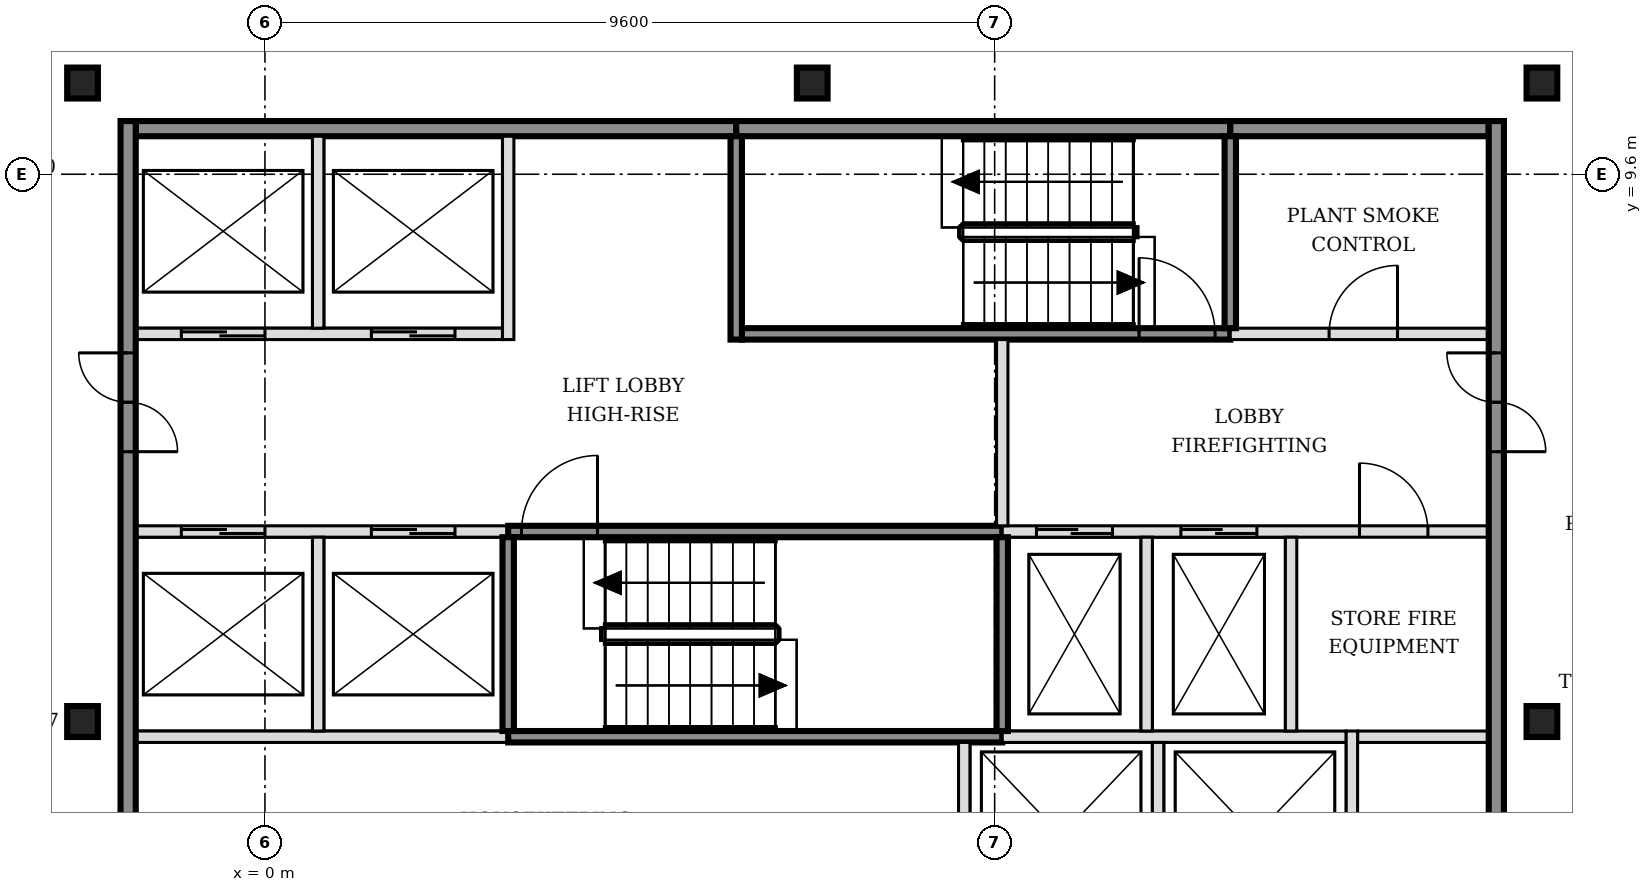
"""IFC4 building model, lengths in metres.
Left out: names, types, materials, properties, quantities, classifications, styles, units other than length and angle.
Written with IfcOpenShell. Run it as: python <this file> out.ifc"""

import sys

from ifc_helpers import new_model, si_unit, direction, frame, frame_2d, origin, origin_2d, place, context, subcontext, project, spatial, rectangle, i_section, extrude, element, fill, save


model = new_model("IFC4")
c1 = context("Model", 3, precision=1e-05, world=origin(), true_north=direction((0.0, 1.0)))
c2 = subcontext(c1, "Body", "Model", "MODEL_VIEW")
j1 = project(units=[si_unit("LENGTHUNIT", "METRE"), si_unit("PLANEANGLEUNIT", "RADIAN")], contexts=[c1])
p1 = place(None, origin())
s1 = spatial("IfcSite", under=j1, at=p1, CompositionType="ELEMENT")
p2 = place(p1, origin())
s2 = spatial("IfcBuilding", under=s1, at=p2, CompositionType="ELEMENT")
p3 = place(p2, frame((0.0, 0.0, 204.6)))
s3 = spatial("IfcBuildingStorey", under=s2, at=p3, CompositionType="ELEMENT", Elevation=204.6)
for number, where, z_axis, x_axis in (
    (1, (-2.4, 2.4, -0.25), (0.0, 0.0, 1.0), (1.0, 0.0, 0.0)),
    (2, (16.8, 2.4, -0.25), (0.0, 0.0, 1.0), (1.0, 0.0, 0.0)),
    (3, (-2.4, 10.8, -0.25), (0.0, 0.0, 1.0), (1.0, 0.0, 0.0)),
    (4, (7.2, 10.8, -0.25), (0.0, 0.0, 1.0), (1.0, 0.0, 0.0)),
    (5, (16.8, 10.8, -0.25), (0.0, 0.0, 1.0), (1.0, 0.0, 0.0)),
):
    element("IfcColumn", number, at=place(p3, frame(where, z_axis=z_axis, x_axis=x_axis)), inside=s3, PredefinedType="COLUMN", context=c2, shape_type="SweptSolid", body=[
        extrude(i_section(OverallWidth=0.404, OverallDepth=0.407, WebThickness=0.027, FlangeThickness=0.044, FilletRadius=0.015, at=origin_2d()), origin(), (0.0, 0.0, 1.0), 6.1),
    ])
p4 = place(p3, frame((-1.7, 2.2, 0.0), z_axis=(0.0, 0.0, 1.0), x_axis=(1.0, 0.0, 0.0)))
e6 = element("IfcWall", 6, at=p4, inside=s3, PredefinedType="SOLIDWALL", context=c2, shape_type="SweptSolid", body=[
    extrude(rectangle(XDim=4.9, YDim=0.15, at=frame_2d((2.45, 0.0))), origin(), (0.0, 0.0, 1.0), 5.85),
])
p5 = place(p3, frame((3.2, 2.2, 0.0), z_axis=(0.0, 0.0, 1.0), x_axis=(1.0, 0.0, 0.0)))
e7 = element("IfcWall", 7, at=p5, inside=s3, PredefinedType="SOLIDWALL", context=c2, shape_type="SweptSolid", body=[
    extrude(rectangle(XDim=6.5, YDim=0.15, at=frame_2d((3.25, 0.0))), origin(), (0.0, 0.0, 1.0), 5.85),
])
p6 = place(p3, frame((9.7, 2.2, 0.0), z_axis=(0.0, 0.0, 1.0), x_axis=(1.0, 0.0, 0.0)))
e8 = element("IfcWall", 8, at=p6, inside=s3, PredefinedType="SOLIDWALL", context=c2, shape_type="SweptSolid", body=[
    extrude(rectangle(XDim=4.525, YDim=0.15, at=frame_2d((2.263, 0.0))), origin(), (0.0, 0.0, 1.0), 5.85),
])
p7 = place(p3, frame((14.375, 2.2, 0.0), z_axis=(0.0, 0.0, 1.0), x_axis=(1.0, 0.0, 0.0)))
e9 = element("IfcWall", 9, at=p7, inside=s3, PredefinedType="PARTITIONING", context=c2, shape_type="SweptSolid", body=[
    extrude(rectangle(XDim=1.725, YDim=0.15, at=frame_2d((0.863, 0.0))), origin(), (0.0, 0.0, 1.0), 5.85),
])
p8 = place(p3, frame((-1.7, 4.9, 0.0), z_axis=(0.0, 0.0, 1.0), x_axis=(1.0, 0.0, 0.0)))
e10 = element("IfcWall", 10, at=p8, inside=s3, PredefinedType="SOLIDWALL", context=c2, shape_type="SweptSolid", body=[
    extrude(rectangle(XDim=4.9, YDim=0.15, at=frame_2d((2.45, 0.0))), origin(), (0.0, 0.0, 1.0), 5.85),
])
p9 = place(p8, frame((0.6, 0.0, 0.0)))
e11 = element("IfcOpeningElement", 11, at=p9, cuts=e10, PredefinedType="OPENING", context=c2, shape_type="SweptSolid", body=[
    extrude(rectangle(XDim=1.1, YDim=2.1, at=frame_2d((0.55, 1.05))), frame((0.0, 0.085, 0.0), z_axis=(0.0, -1.0, 0.0), x_axis=(1.0, 0.0, 0.0)), (0.0, 0.0, 1.0), 0.17),
])
p10 = place(p8, frame((3.1, 0.0, 0.0)))
e12 = element("IfcOpeningElement", 12, at=p10, cuts=e10, PredefinedType="OPENING", context=c2, shape_type="SweptSolid", body=[
    extrude(rectangle(XDim=1.1, YDim=2.1, at=frame_2d((0.55, 1.05))), frame((0.0, 0.085, 0.0), z_axis=(0.0, -1.0, 0.0), x_axis=(1.0, 0.0, 0.0)), (0.0, 0.0, 1.0), 0.17),
])
p11 = place(p3, frame((3.2, 4.9, 0.0), z_axis=(0.0, 0.0, 1.0), x_axis=(1.0, 0.0, 0.0)))
e13 = element("IfcWall", 13, at=p11, inside=s3, PredefinedType="SOLIDWALL", context=c2, shape_type="SweptSolid", body=[
    extrude(rectangle(XDim=6.5, YDim=0.15, at=frame_2d((3.25, 0.0))), origin(), (0.0, 0.0, 1.0), 5.85),
])
p12 = place(p11, frame((0.175, 0.0, 0.0)))
e14 = element("IfcOpeningElement", 14, at=p12, cuts=e13, PredefinedType="OPENING", context=c2, shape_type="SweptSolid", body=[
    extrude(rectangle(XDim=1.0, YDim=2.1, at=frame_2d((0.5, 1.05))), frame((0.0, 0.085, 0.0), z_axis=(0.0, -1.0, 0.0), x_axis=(1.0, 0.0, 0.0)), (0.0, 0.0, 1.0), 0.17),
])
p13 = place(p3, frame((9.7, 4.9, 0.0), z_axis=(0.0, 0.0, 1.0), x_axis=(1.0, 0.0, 0.0)))
e15 = element("IfcWall", 15, at=p13, inside=s3, PredefinedType="SOLIDWALL", context=c2, shape_type="SweptSolid", body=[
    extrude(rectangle(XDim=6.4, YDim=0.15, at=frame_2d((3.2, 0.0))), origin(), (0.0, 0.0, 1.0), 5.85),
])
p14 = place(p13, frame((0.45, 0.0, 0.0)))
e16 = element("IfcOpeningElement", 16, at=p14, cuts=e15, PredefinedType="OPENING", context=c2, shape_type="SweptSolid", body=[
    extrude(rectangle(XDim=1.0, YDim=2.1, at=frame_2d((0.5, 1.05))), frame((0.0, 0.085, 0.0), z_axis=(0.0, -1.0, 0.0), x_axis=(1.0, 0.0, 0.0)), (0.0, 0.0, 1.0), 0.17),
])
p15 = place(p13, frame((2.35, 0.0, 0.0)))
e17 = element("IfcOpeningElement", 17, at=p15, cuts=e15, PredefinedType="OPENING", context=c2, shape_type="SweptSolid", body=[
    extrude(rectangle(XDim=1.0, YDim=2.1, at=frame_2d((0.5, 1.05))), frame((0.0, 0.085, 0.0), z_axis=(0.0, -1.0, 0.0), x_axis=(1.0, 0.0, 0.0)), (0.0, 0.0, 1.0), 0.17),
])
p16 = place(p13, frame((4.7, 0.0, 0.0)))
e18 = element("IfcOpeningElement", 18, at=p16, cuts=e15, PredefinedType="OPENING", context=c2, shape_type="SweptSolid", body=[
    extrude(rectangle(XDim=0.9, YDim=2.1, at=frame_2d((0.45, 1.05))), frame((0.0, 0.085, 0.0), z_axis=(0.0, -1.0, 0.0), x_axis=(1.0, 0.0, 0.0)), (0.0, 0.0, 1.0), 0.17),
])
p17 = place(p3, frame((-1.7, 7.5, 0.0), z_axis=(0.0, 0.0, 1.0), x_axis=(1.0, 0.0, 0.0)))
e19 = element("IfcWall", 19, at=p17, inside=s3, PredefinedType="SOLIDWALL", context=c2, shape_type="SweptSolid", body=[
    extrude(rectangle(XDim=4.825, YDim=0.15, at=frame_2d((2.413, 0.0))), origin(), (0.0, 0.0, 1.0), 5.85),
])
p18 = place(p17, frame((0.6, 0.0, 0.0)))
e20 = element("IfcOpeningElement", 20, at=p18, cuts=e19, PredefinedType="OPENING", context=c2, shape_type="SweptSolid", body=[
    extrude(rectangle(XDim=1.1, YDim=2.1, at=frame_2d((0.55, 1.05))), frame((0.0, 0.085, 0.0), z_axis=(0.0, -1.0, 0.0), x_axis=(1.0, 0.0, 0.0)), (0.0, 0.0, 1.0), 0.17),
])
p19 = place(p17, frame((3.1, 0.0, 0.0)))
e21 = element("IfcOpeningElement", 21, at=p19, cuts=e19, PredefinedType="OPENING", context=c2, shape_type="SweptSolid", body=[
    extrude(rectangle(XDim=1.1, YDim=2.1, at=frame_2d((0.55, 1.05))), frame((0.0, 0.085, 0.0), z_axis=(0.0, -1.0, 0.0), x_axis=(1.0, 0.0, 0.0)), (0.0, 0.0, 1.0), 0.17),
])
p20 = place(p3, frame((6.275, 7.5, 0.0), z_axis=(0.0, 0.0, 1.0), x_axis=(1.0, 0.0, 0.0)))
e22 = element("IfcWall", 22, at=p20, inside=s3, PredefinedType="SOLIDWALL", context=c2, shape_type="SweptSolid", body=[
    extrude(rectangle(XDim=6.425, YDim=0.15, at=frame_2d((3.212, 0.0))), origin(), (0.0, 0.0, 1.0), 5.85),
])
p21 = place(p20, frame((5.225, 0.0, 0.0)))
e23 = element("IfcOpeningElement", 23, at=p21, cuts=e22, PredefinedType="OPENING", context=c2, shape_type="SweptSolid", body=[
    extrude(rectangle(XDim=1.0, YDim=2.1, at=frame_2d((0.5, 1.05))), frame((0.0, 0.085, 0.0), z_axis=(0.0, -1.0, 0.0), x_axis=(1.0, 0.0, 0.0)), (0.0, 0.0, 1.0), 0.17),
])
p22 = place(p3, frame((12.7, 7.5, 0.0), z_axis=(0.0, 0.0, 1.0), x_axis=(1.0, 0.0, 0.0)))
e24 = element("IfcWall", 24, at=p22, inside=s3, PredefinedType="SOLIDWALL", context=c2, shape_type="SweptSolid", body=[
    extrude(rectangle(XDim=3.4, YDim=0.15, at=frame_2d((1.7, 0.0))), origin(), (0.0, 0.0, 1.0), 5.85),
])
p23 = place(p22, frame((1.3, 0.0, 0.0)))
e25 = element("IfcOpeningElement", 25, at=p23, cuts=e24, PredefinedType="OPENING", context=c2, shape_type="SweptSolid", body=[
    extrude(rectangle(XDim=0.9, YDim=2.1, at=frame_2d((0.45, 1.05))), frame((0.0, 0.085, 0.0), z_axis=(0.0, -1.0, 0.0), x_axis=(1.0, 0.0, 0.0)), (0.0, 0.0, 1.0), 0.17),
])
p24 = place(p3, frame((-1.7, 10.2, 0.0), z_axis=(0.0, 0.0, 1.0), x_axis=(1.0, 0.0, 0.0)))
e26 = element("IfcWall", 26, at=p24, inside=s3, PredefinedType="SOLIDWALL", context=c2, shape_type="SweptSolid", body=[
    extrude(rectangle(XDim=7.9, YDim=0.2, at=frame_2d((3.95, 0.0))), origin(), (0.0, 0.0, 1.0), 5.85),
])
p25 = place(p3, frame((6.2, 10.2, 0.0), z_axis=(0.0, 0.0, 1.0), x_axis=(1.0, 0.0, 0.0)))
e27 = element("IfcWall", 27, at=p25, inside=s3, PredefinedType="SOLIDWALL", context=c2, shape_type="SweptSolid", body=[
    extrude(rectangle(XDim=6.5, YDim=0.2, at=frame_2d((3.25, 0.0))), origin(), (0.0, 0.0, 1.0), 5.85),
])
p26 = place(p3, frame((12.7, 10.2, 0.0), z_axis=(0.0, 0.0, 1.0), x_axis=(1.0, 0.0, 0.0)))
e28 = element("IfcWall", 28, at=p26, inside=s3, PredefinedType="SOLIDWALL", context=c2, shape_type="SweptSolid", body=[
    extrude(rectangle(XDim=3.4, YDim=0.2, at=frame_2d((1.7, 0.0))), origin(), (0.0, 0.0, 1.0), 5.85),
])
p27 = place(p3, frame((-1.8, -5.5, 0.0), z_axis=(0.0, 0.0, 1.0), x_axis=(0.0, 1.0, 0.0)))
e29 = element("IfcWall", 29, at=p27, inside=s3, PredefinedType="SOLIDWALL", context=c2, shape_type="SweptSolid", body=[
    extrude(rectangle(XDim=15.8, YDim=0.2, at=frame_2d((7.9, 0.0))), origin(), (0.0, 0.0, 1.0), 5.85),
])
p28 = place(p27, frame((3.05, 0.0, 0.0)))
e30 = element("IfcOpeningElement", 30, at=p28, cuts=e29, PredefinedType="OPENING", context=c2, shape_type="SweptSolid", body=[
    extrude(rectangle(XDim=1.3, YDim=2.1, at=frame_2d((0.65, 1.05))), frame((0.0, 0.11, 0.0), z_axis=(0.0, -1.0, 0.0), x_axis=(1.0, 0.0, 0.0)), (0.0, 0.0, 1.0), 0.22),
])
p29 = place(p27, frame((11.45, 0.0, 0.0)))
e31 = element("IfcOpeningElement", 31, at=p29, cuts=e29, PredefinedType="OPENING", context=c2, shape_type="SweptSolid", body=[
    extrude(rectangle(XDim=1.3, YDim=2.1, at=frame_2d((0.65, 1.05))), frame((0.0, 0.11, 0.0), z_axis=(0.0, -1.0, 0.0), x_axis=(1.0, 0.0, 0.0)), (0.0, 0.0, 1.0), 0.22),
])
p30 = place(p3, frame((0.7, 2.275, 0.0), z_axis=(0.0, 0.0, 1.0), x_axis=(0.0, 1.0, 0.0)))
e32 = element("IfcWall", 32, at=p30, inside=s3, PredefinedType="SOLIDWALL", context=c2, shape_type="SweptSolid", body=[
    extrude(rectangle(XDim=2.55, YDim=0.15, at=frame_2d((1.275, 0.0))), origin(), (0.0, 0.0, 1.0), 5.85),
])
p31 = place(p3, frame((0.7, 7.575, 0.0), z_axis=(0.0, 0.0, 1.0), x_axis=(0.0, 1.0, 0.0)))
e33 = element("IfcWall", 33, at=p31, inside=s3, PredefinedType="SOLIDWALL", context=c2, shape_type="SweptSolid", body=[
    extrude(rectangle(XDim=2.525, YDim=0.15, at=frame_2d((1.263, 0.0))), origin(), (0.0, 0.0, 1.0), 5.85),
])
p32 = place(p3, frame((3.2, 2.275, 0.0), z_axis=(0.0, 0.0, 1.0), x_axis=(0.0, 1.0, 0.0)))
e34 = element("IfcWall", 34, at=p32, inside=s3, PredefinedType="SOLIDWALL", context=c2, shape_type="SweptSolid", body=[
    extrude(rectangle(XDim=2.55, YDim=0.15, at=frame_2d((1.275, 0.0))), origin(), (0.0, 0.0, 1.0), 5.85),
])
for number, where, z_axis, x_axis in (
    (35, (3.2, 7.425, 0.0), (0.0, 0.0, 1.0), (0.0, 1.0, 0.0)),
    (36, (6.2, 7.425, 0.0), (0.0, 0.0, 1.0), (0.0, 1.0, 0.0)),
):
    element("IfcWall", number, at=place(p3, frame(where, z_axis=z_axis, x_axis=x_axis)), inside=s3, PredefinedType="SOLIDWALL", context=c2, shape_type="SweptSolid", body=[
        extrude(rectangle(XDim=2.675, YDim=0.15, at=frame_2d((1.337, 0.0))), origin(), (0.0, 0.0, 1.0), 5.85),
    ])
p33 = place(p3, frame((9.2, -0.475, 0.0), z_axis=(0.0, 0.0, 1.0), x_axis=(0.0, 1.0, 0.0)))
e37 = element("IfcWall", 37, at=p33, inside=s3, PredefinedType="SOLIDWALL", context=c2, shape_type="SweptSolid", body=[
    extrude(rectangle(XDim=2.6, YDim=0.15, at=frame_2d((1.3, 0.0))), origin(), (0.0, 0.0, 1.0), 5.85),
])
p34 = place(p3, frame((9.7, 2.275, 0.0), z_axis=(0.0, 0.0, 1.0), x_axis=(0.0, 1.0, 0.0)))
e38 = element("IfcWall", 38, at=p34, inside=s3, PredefinedType="SOLIDWALL", context=c2, shape_type="SweptSolid", body=[
    extrude(rectangle(XDim=2.55, YDim=0.15, at=frame_2d((1.275, 0.0))), origin(), (0.0, 0.0, 1.0), 5.85),
])
p35 = place(p3, frame((9.7, 4.975, 0.0), z_axis=(0.0, 0.0, 1.0), x_axis=(0.0, 1.0, 0.0)))
e39 = element("IfcWall", 39, at=p35, inside=s3, PredefinedType="SOLIDWALL", context=c2, shape_type="SweptSolid", body=[
    extrude(rectangle(XDim=2.45, YDim=0.15, at=frame_2d((1.225, 0.0))), origin(), (0.0, 0.0, 1.0), 5.85),
])
p36 = place(p3, frame((11.6, 2.275, 0.0), z_axis=(0.0, 0.0, 1.0), x_axis=(0.0, 1.0, 0.0)))
e40 = element("IfcWall", 40, at=p36, inside=s3, PredefinedType="SOLIDWALL", context=c2, shape_type="SweptSolid", body=[
    extrude(rectangle(XDim=2.55, YDim=0.15, at=frame_2d((1.275, 0.0))), origin(), (0.0, 0.0, 1.0), 5.85),
])
p37 = place(p3, frame((11.75, -0.325, 0.0), z_axis=(0.0, 0.0, 1.0), x_axis=(0.0, 1.0, 0.0)))
e41 = element("IfcWall", 41, at=p37, inside=s3, PredefinedType="SOLIDWALL", context=c2, shape_type="SweptSolid", body=[
    extrude(rectangle(XDim=2.45, YDim=0.15, at=frame_2d((1.225, 0.0))), origin(), (0.0, 0.0, 1.0), 5.85),
])
p38 = place(p3, frame((12.7, 7.575, 0.0), z_axis=(0.0, 0.0, 1.0), x_axis=(0.0, 1.0, 0.0)))
e42 = element("IfcWall", 42, at=p38, inside=s3, PredefinedType="SOLIDWALL", context=c2, shape_type="SweptSolid", body=[
    extrude(rectangle(XDim=2.525, YDim=0.15, at=frame_2d((1.263, 0.0))), origin(), (0.0, 0.0, 1.0), 5.85),
])
p39 = place(p3, frame((13.5, 2.275, 0.0), z_axis=(0.0, 0.0, 1.0), x_axis=(0.0, 1.0, 0.0)))
e43 = element("IfcWall", 43, at=p39, inside=s3, PredefinedType="SOLIDWALL", context=c2, shape_type="SweptSolid", body=[
    extrude(rectangle(XDim=2.55, YDim=0.15, at=frame_2d((1.275, 0.0))), origin(), (0.0, 0.0, 1.0), 5.85),
])
p40 = place(p3, frame((14.3, -0.475, 0.0), z_axis=(0.0, 0.0, 1.0), x_axis=(0.0, 1.0, 0.0)))
e44 = element("IfcWall", 44, at=p40, inside=s3, PredefinedType="SOLIDWALL", context=c2, shape_type="SweptSolid", body=[
    extrude(rectangle(XDim=2.75, YDim=0.15, at=frame_2d((1.375, 0.0))), origin(), (0.0, 0.0, 1.0), 5.85),
])
p41 = place(p3, frame((16.2, -5.5, 0.0), z_axis=(0.0, 0.0, 1.0), x_axis=(0.0, 1.0, 0.0)))
e45 = element("IfcWall", 45, at=p41, inside=s3, PredefinedType="SOLIDWALL", context=c2, shape_type="SweptSolid", body=[
    extrude(rectangle(XDim=15.8, YDim=0.2, at=frame_2d((7.9, 0.0))), origin(), (0.0, 0.0, 1.0), 5.85),
])
p42 = place(p41, frame((3.05, 0.0, 0.0)))
e46 = element("IfcOpeningElement", 46, at=p42, cuts=e45, PredefinedType="OPENING", context=c2, shape_type="SweptSolid", body=[
    extrude(rectangle(XDim=1.3, YDim=2.1, at=frame_2d((0.65, 1.05))), frame((0.0, 0.11, 0.0), z_axis=(0.0, -1.0, 0.0), x_axis=(1.0, 0.0, 0.0)), (0.0, 0.0, 1.0), 0.22),
])
p43 = place(p41, frame((11.45, 0.0, 0.0)))
e47 = element("IfcOpeningElement", 47, at=p43, cuts=e45, PredefinedType="OPENING", context=c2, shape_type="SweptSolid", body=[
    extrude(rectangle(XDim=1.3, YDim=2.1, at=frame_2d((0.65, 1.05))), frame((0.0, 0.11, 0.0), z_axis=(0.0, -1.0, 0.0), x_axis=(1.0, 0.0, 0.0)), (0.0, 0.0, 1.0), 0.22),
])
p44 = place(p9, origin())
e48 = element("IfcDoor", 48, at=p44, inside=s3, OperationType="DOUBLE_DOOR_SLIDING", PredefinedType="DOOR", context=c2, shape_type="SweptSolid", body=[
    extrude(rectangle(XDim=1.1, YDim=2.1, at=frame_2d((0.55, 1.05))), frame((0.0, 0.025, 0.0), z_axis=(0.0, -1.0, 0.0), x_axis=(1.0, 0.0, 0.0)), (0.0, 0.0, 1.0), 0.05),
])
fill(e11, e48)
p45 = place(p10, origin())
e49 = element("IfcDoor", 49, at=p45, inside=s3, OperationType="DOUBLE_DOOR_SLIDING", PredefinedType="DOOR", context=c2, shape_type="SweptSolid", body=[
    extrude(rectangle(XDim=1.1, YDim=2.1, at=frame_2d((0.55, 1.05))), frame((0.0, 0.025, 0.0), z_axis=(0.0, -1.0, 0.0), x_axis=(1.0, 0.0, 0.0)), (0.0, 0.0, 1.0), 0.05),
])
fill(e12, e49)
p46 = place(p18, origin())
e50 = element("IfcDoor", 50, at=p46, inside=s3, OperationType="DOUBLE_DOOR_SLIDING", PredefinedType="DOOR", context=c2, shape_type="SweptSolid", body=[
    extrude(rectangle(XDim=1.1, YDim=2.1, at=frame_2d((0.55, 1.05))), frame((0.0, 0.025, 0.0), z_axis=(0.0, -1.0, 0.0), x_axis=(1.0, 0.0, 0.0)), (0.0, 0.0, 1.0), 0.05),
])
fill(e20, e50)
p47 = place(p19, origin())
e51 = element("IfcDoor", 51, at=p47, inside=s3, OperationType="DOUBLE_DOOR_SLIDING", PredefinedType="DOOR", context=c2, shape_type="SweptSolid", body=[
    extrude(rectangle(XDim=1.1, YDim=2.1, at=frame_2d((0.55, 1.05))), frame((0.0, 0.025, 0.0), z_axis=(0.0, -1.0, 0.0), x_axis=(1.0, 0.0, 0.0)), (0.0, 0.0, 1.0), 0.05),
])
fill(e21, e51)
p48 = place(p14, origin())
e52 = element("IfcDoor", 52, at=p48, inside=s3, OperationType="DOUBLE_DOOR_SLIDING", PredefinedType="DOOR", context=c2, shape_type="SweptSolid", body=[
    extrude(rectangle(XDim=1.0, YDim=2.1, at=frame_2d((0.5, 1.05))), frame((0.0, 0.025, 0.0), z_axis=(0.0, -1.0, 0.0), x_axis=(1.0, 0.0, 0.0)), (0.0, 0.0, 1.0), 0.05),
])
fill(e16, e52)
p49 = place(p15, origin())
e53 = element("IfcDoor", 53, at=p49, inside=s3, OperationType="DOUBLE_DOOR_SLIDING", PredefinedType="DOOR", context=c2, shape_type="SweptSolid", body=[
    extrude(rectangle(XDim=1.0, YDim=2.1, at=frame_2d((0.5, 1.05))), frame((0.0, 0.025, 0.0), z_axis=(0.0, -1.0, 0.0), x_axis=(1.0, 0.0, 0.0)), (0.0, 0.0, 1.0), 0.05),
])
fill(e17, e53)
p50 = place(p12, origin())
e54 = element("IfcDoor", 54, at=p50, inside=s3, OperationType="SINGLE_SWING_RIGHT", PredefinedType="DOOR", context=c2, shape_type="SweptSolid", body=[
    extrude(rectangle(XDim=1.0, YDim=2.1, at=frame_2d((0.5, 1.05))), frame((0.0, 0.025, 0.0), z_axis=(0.0, -1.0, 0.0), x_axis=(1.0, 0.0, 0.0)), (0.0, 0.0, 1.0), 0.05),
])
fill(e14, e54)
p51 = place(p21, origin())
e55 = element("IfcDoor", 55, at=p51, inside=s3, OperationType="SINGLE_SWING_LEFT", PredefinedType="DOOR", context=c2, shape_type="SweptSolid", body=[
    extrude(rectangle(XDim=1.0, YDim=2.1, at=frame_2d((0.5, 1.05))), frame((0.0, 0.025, 0.0), z_axis=(0.0, -1.0, 0.0), x_axis=(1.0, 0.0, 0.0)), (0.0, 0.0, 1.0), 0.05),
])
fill(e23, e55)
p52 = place(p29, origin())
e56 = element("IfcDoor", 56, at=p52, inside=s3, OperationType="DOUBLE_DOOR_SINGLE_SWING", PredefinedType="DOOR", context=c2, shape_type="SweptSolid", body=[
    extrude(rectangle(XDim=1.3, YDim=2.1, at=frame_2d((0.65, 1.05))), frame((0.0, 0.025, 0.0), z_axis=(0.0, -1.0, 0.0), x_axis=(1.0, 0.0, 0.0)), (0.0, 0.0, 1.0), 0.05),
])
fill(e31, e56)
p53 = place(p43, origin())
e57 = element("IfcDoor", 57, at=p53, inside=s3, OperationType="DOUBLE_DOOR_SINGLE_SWING", PredefinedType="DOOR", context=c2, shape_type="SweptSolid", body=[
    extrude(rectangle(XDim=1.3, YDim=2.1, at=frame_2d((0.65, 1.05))), frame((0.0, 0.025, 0.0), z_axis=(0.0, -1.0, 0.0), x_axis=(1.0, 0.0, 0.0)), (0.0, 0.0, 1.0), 0.05),
])
fill(e47, e57)
p54 = place(p16, origin())
e58 = element("IfcDoor", 58, at=p54, inside=s3, OperationType="SINGLE_SWING_LEFT", PredefinedType="DOOR", context=c2, shape_type="SweptSolid", body=[
    extrude(rectangle(XDim=0.9, YDim=2.1, at=frame_2d((0.45, 1.05))), frame((0.0, 0.025, 0.0), z_axis=(0.0, -1.0, 0.0), x_axis=(1.0, 0.0, 0.0)), (0.0, 0.0, 1.0), 0.05),
])
fill(e18, e58)
p55 = place(p23, origin())
e59 = element("IfcDoor", 59, at=p55, inside=s3, OperationType="SINGLE_SWING_RIGHT", PredefinedType="DOOR", context=c2, shape_type="SweptSolid", body=[
    extrude(rectangle(XDim=0.9, YDim=2.1, at=frame_2d((0.45, 1.05))), frame((0.0, 0.025, 0.0), z_axis=(0.0, -1.0, 0.0), x_axis=(1.0, 0.0, 0.0)), (0.0, 0.0, 1.0), 0.05),
])
fill(e25, e59)
save(model, sys.argv[1])
